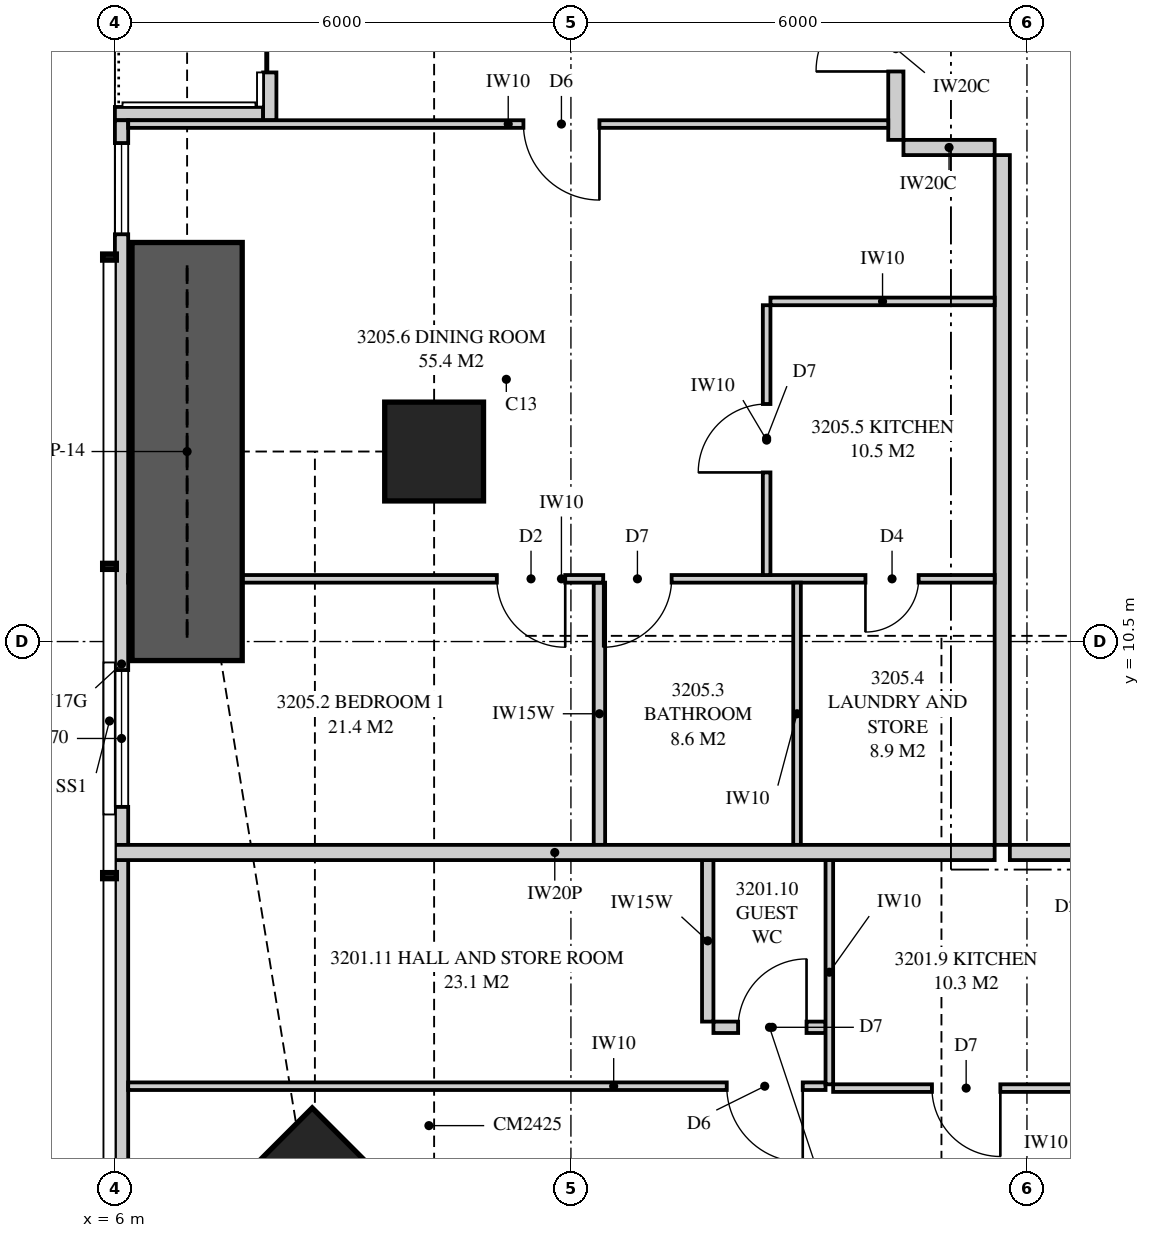
"""IFC4 building model, lengths in metres.
Left out: names, types, materials, properties, quantities, classifications, styles, units other than length and angle.
Written with IfcOpenShell. Run it as: python <this file> out.ifc"""

import sys

from ifc_helpers import new_model, si_unit, direction, frame, frame_2d, origin, origin_2d, place, context, subcontext, project, spatial, polyline, rectangle, outline, extrude, element, fill, save


model = new_model("IFC4")
c1 = context("Model", 3, precision=1e-05, world=origin(), true_north=direction((0.0, 1.0)))
c2 = subcontext(c1, "Body", "Model", "MODEL_VIEW")
j1 = project(units=[si_unit("LENGTHUNIT", "METRE"), si_unit("PLANEANGLEUNIT", "RADIAN")], contexts=[c1])
p1 = place(None, origin())
s1 = spatial("IfcSite", under=j1, at=p1, CompositionType="ELEMENT")
p2 = place(p1, origin())
s2 = spatial("IfcBuilding", under=s1, at=p2, CompositionType="ELEMENT")
p3 = place(p2, frame((0.0, 0.0, 118.25)))
s3 = spatial("IfcBuildingStorey", under=s2, at=p3, CompositionType="ELEMENT", Elevation=118.25)
p4 = place(p3, frame((8.631, 2.631, 0.0), z_axis=(0.0, 0.0, 1.0), x_axis=(0.707106781187, 0.707106781187, 0.0)))
e1 = element("IfcColumn", 1, at=p4, inside=s3, PredefinedType="COLUMN", context=c2, shape_type="SweptSolid", body=[
    extrude(rectangle(XDim=2.4, YDim=2.5, at=origin_2d()), origin(), (0.0, 0.0, 1.0), 3.35),
])
p5 = place(p3, frame((10.2, 13.0, 0.0), z_axis=(0.0, 0.0, 1.0), x_axis=(1.0, 0.0, 0.0)))
e2 = element("IfcColumn", 2, at=p5, inside=s3, PredefinedType="COLUMN", context=c2, shape_type="SweptSolid", body=[
    extrude(rectangle(XDim=1.3, YDim=1.3, at=origin_2d()), origin(), (0.0, 0.0, 1.0), 3.35),
])
p6 = place(p3, frame((6.087, 17.358, 0.0), z_axis=(0.0, 0.0, 1.0), x_axis=(0.0, -1.0, 0.0)))
e3 = element("IfcWall", 3, at=p6, inside=s3, PredefinedType="SOLIDWALL", context=c2, shape_type="SweptSolid", body=[
    extrude(outline(polyline([(0.0, 0.0), (14.307, 0.0), (14.307, 3.11), (4.577, 3.11), (4.577, 2.15), (4.484, 2.15), (4.484, 3.11), (4.358, 3.11), (4.358, 2.15), (0.0, 2.15), (0.0, 0.0)])), frame((0.0, 0.087, 0.0), z_axis=(0.0, -1.0, 0.0), x_axis=(1.0, 0.0, 0.0)), (0.0, 0.0, 1.0), 0.175),
])
p7 = place(p6, frame((0.3, 0.0, 0.4)))
e4 = element("IfcOpeningElement", 4, at=p7, cuts=e3, PredefinedType="OPENING", context=c2, shape_type="SweptSolid", body=[
    extrude(rectangle(XDim=1.2, YDim=1.7, at=frame_2d((0.6, 0.85))), frame((0.0, 0.097, 0.0), z_axis=(0.0, -1.0, 0.0), x_axis=(1.0, 0.0, 0.0)), (0.0, 0.0, 1.0), 0.195),
])
p8 = place(p6, frame((7.233, 0.0, 0.4)))
e5 = element("IfcOpeningElement", 5, at=p8, cuts=e3, PredefinedType="OPENING", context=c2, shape_type="SweptSolid", body=[
    extrude(rectangle(XDim=1.8, YDim=1.7, at=frame_2d((0.9, 0.85))), frame((0.0, 0.097, 0.0), z_axis=(0.0, -1.0, 0.0), x_axis=(1.0, 0.0, 0.0)), (0.0, 0.0, 1.0), 0.195),
])
p9 = place(p3, frame((8.038, 20.417, 0.0), z_axis=(0.0, 0.0, 1.0), x_axis=(0.0, -1.0, 0.0)))
e6 = element("IfcWall", 6, at=p9, inside=s3, PredefinedType="SOLIDWALL", context=c2, shape_type="SweptSolid", body=[
    extrude(rectangle(XDim=3.058, YDim=0.175, at=frame_2d((1.529, 0.0))), origin(), (0.0, 0.0, 1.0), 3.11),
])
p10 = place(p9, frame((0.629, 0.0, 0.0)))
e7 = element("IfcOpeningElement", 7, at=p10, cuts=e6, PredefinedType="OPENING", context=c2, shape_type="SweptSolid", body=[
    extrude(rectangle(XDim=1.8, YDim=2.1, at=frame_2d((0.9, 1.05))), frame((0.0, 0.097, 0.0), z_axis=(0.0, -1.0, 0.0), x_axis=(1.0, 0.0, 0.0)), (0.0, 0.0, 1.0), 0.195),
])
p11 = place(p3, frame((6.0, 17.446, 0.0), z_axis=(0.0, 0.0, 1.0), x_axis=(1.0, 0.0, 0.0)))
e8 = element("IfcWall", 8, at=p11, inside=s3, PredefinedType="SOLIDWALL", context=c2, shape_type="SweptSolid", body=[
    extrude(outline(polyline([(0.0, 0.0), (1.95, 0.0), (1.95, 3.11), (1.75, 3.11), (1.75, 2.15), (0.15, 2.15), (0.15, 3.11), (0.0, 3.11), (0.0, 0.0)])), frame((0.0, 0.087, 0.0), z_axis=(0.0, -1.0, 0.0), x_axis=(1.0, 0.0, 0.0)), (0.0, 0.0, 1.0), 0.175),
])
p12 = place(p3, frame((17.775, 7.725, 0.0), z_axis=(0.0, 0.0, 1.0), x_axis=(1.0, 0.0, 0.0)))
e9 = element("IfcWall", 9, at=p12, inside=s3, PredefinedType="PARTITIONING", context=c2, shape_type="SweptSolid", body=[
    extrude(outline(polyline([(0.0, 0.0), (19.225, 0.0), (19.225, 3.11), (10.312, 3.11), (10.312, 2.541), (9.638, 2.541), (9.638, 3.11), (0.0, 3.11), (0.0, 0.0)])), frame((0.0, 0.1, 0.0), z_axis=(0.0, -1.0, 0.0), x_axis=(1.0, 0.0, 0.0)), (0.0, 0.0, 1.0), 0.2),
])
p13 = place(p12, frame((3.275, 0.0, 0.0)))
e10 = element("IfcOpeningElement", 10, at=p13, cuts=e9, PredefinedType="OPENING", context=c2, shape_type="SweptSolid", body=[
    extrude(rectangle(XDim=1.05, YDim=2.2, at=frame_2d((0.525, 1.1))), frame((0.0, 0.11, 0.0), z_axis=(0.0, -1.0, 0.0), x_axis=(1.0, 0.0, 0.0)), (0.0, 0.0, 1.0), 0.22),
])
p14 = place(p3, frame((15.45, 4.625, 0.0), z_axis=(0.0, 0.0, 1.0), x_axis=(1.0, 0.0, 0.0)))
e11 = element("IfcWall", 11, at=p14, inside=s3, PredefinedType="PARTITIONING", context=c2, shape_type="SweptSolid", body=[
    extrude(outline(polyline([(0.0, 0.0), (3.5, 0.0), (3.5, 3.11), (1.712, 3.11), (1.712, 2.541), (1.138, 2.541), (1.138, 3.11), (0.0, 3.11), (0.0, 0.0)])), frame((0.0, 0.05, 0.0), z_axis=(0.0, -1.0, 0.0), x_axis=(1.0, 0.0, 0.0)), (0.0, 0.0, 1.0), 0.1),
])
p15 = place(p14, frame((1.3, 0.0, 0.0)))
e12 = element("IfcOpeningElement", 12, at=p15, cuts=e11, PredefinedType="OPENING", context=c2, shape_type="SweptSolid", body=[
    extrude(rectangle(XDim=0.9, YDim=2.1, at=frame_2d((0.45, 1.05))), frame((0.0, 0.06, 0.0), z_axis=(0.0, -1.0, 0.0), x_axis=(1.0, 0.0, 0.0)), (0.0, 0.0, 1.0), 0.12),
])
p16 = place(p3, frame((15.4, 4.675, 0.0), z_axis=(0.0, 0.0, 1.0), x_axis=(0.0, 1.0, 0.0)))
e13 = element("IfcWall", 13, at=p16, inside=s3, PredefinedType="PARTITIONING", context=c2, shape_type="SweptSolid", body=[
    extrude(rectangle(XDim=2.95, YDim=0.1, at=frame_2d((1.475, 0.0))), origin(), (0.0, 0.0, 1.0), 3.11),
])
p17 = place(p3, frame((13.875, 5.425, 0.0), z_axis=(0.0, 0.0, 1.0), x_axis=(1.0, 0.0, 0.0)))
e14 = element("IfcWall", 14, at=p17, inside=s3, PredefinedType="PLUMBINGWALL", context=c2, shape_type="SweptSolid", body=[
    extrude(rectangle(XDim=1.475, YDim=0.15, at=frame_2d((0.738, 0.0))), origin(), (0.0, 0.0, 1.0), 3.11),
])
p18 = place(p17, frame((0.325, 0.0, 0.0)))
e15 = element("IfcOpeningElement", 15, at=p18, cuts=e14, PredefinedType="OPENING", context=c2, shape_type="SweptSolid", body=[
    extrude(rectangle(XDim=0.9, YDim=2.1, at=frame_2d((0.45, 1.05))), frame((0.0, 0.085, 0.0), z_axis=(0.0, -1.0, 0.0), x_axis=(1.0, 0.0, 0.0)), (0.0, 0.0, 1.0), 0.17),
])
p19 = place(p3, frame((13.8, 5.5, 0.0), z_axis=(0.0, 0.0, 1.0), x_axis=(0.0, 1.0, 0.0)))
e16 = element("IfcWall", 16, at=p19, inside=s3, PredefinedType="PLUMBINGWALL", context=c2, shape_type="SweptSolid", body=[
    extrude(rectangle(XDim=2.125, YDim=0.15, at=frame_2d((1.062, 0.0))), origin(), (0.0, 0.0, 1.0), 3.11),
])
p20 = place(p3, frame((6.175, 4.65, 0.0), z_axis=(0.0, 0.0, 1.0), x_axis=(1.0, 0.0, 0.0)))
e17 = element("IfcWall", 17, at=p20, inside=s3, PredefinedType="PARTITIONING", context=c2, shape_type="SweptSolid", body=[
    extrude(outline(polyline([(0.0, 0.0), (9.175, 0.0), (9.175, 3.11), (5.285, 3.11), (5.285, 2.51), (3.0, 2.51), (3.0, 2.15), (1.258, 2.15), (1.258, 3.11), (0.0, 3.11), (0.0, 0.0)])), frame((0.0, 0.05, 0.0), z_axis=(0.0, -1.0, 0.0), x_axis=(1.0, 0.0, 0.0)), (0.0, 0.0, 1.0), 0.1),
])
p21 = place(p20, frame((7.875, 0.0, 0.0)))
e18 = element("IfcOpeningElement", 18, at=p21, cuts=e17, PredefinedType="OPENING", context=c2, shape_type="SweptSolid", body=[
    extrude(rectangle(XDim=1.0, YDim=2.1, at=frame_2d((0.5, 1.05))), frame((0.0, 0.06, 0.0), z_axis=(0.0, -1.0, 0.0), x_axis=(1.0, 0.0, 0.0)), (0.0, 0.0, 1.0), 0.12),
])
p22 = place(p3, frame((6.0, 7.725, 0.0), z_axis=(0.0, 0.0, 1.0), x_axis=(1.0, 0.0, 0.0)))
e19 = element("IfcWall", 19, at=p22, inside=s3, PredefinedType="PARTITIONING", context=c2, shape_type="SweptSolid", body=[
    extrude(outline(polyline([(0.0, 0.0), (11.575, 0.0), (11.575, 3.11), (11.212, 3.11), (11.212, 2.541), (10.538, 2.541), (10.538, 3.11), (5.51, 3.11), (5.51, 2.51), (2.969, 2.51), (2.969, 2.541), (2.727, 2.541), (2.727, 2.15), (0.884, 2.15), (0.884, 3.11), (0.0, 3.11), (0.0, 0.0)])), frame((0.0, 0.1, 0.0), z_axis=(0.0, -1.0, 0.0), x_axis=(1.0, 0.0, 0.0)), (0.0, 0.0, 1.0), 0.2),
])
p23 = place(p3, frame((17.675, 7.825, 0.0), z_axis=(0.0, 0.0, 1.0), x_axis=(0.0, 1.0, 0.0)))
e20 = element("IfcWall", 20, at=p23, inside=s3, PredefinedType="PARTITIONING", context=c2, shape_type="SweptSolid", body=[
    extrude(outline(polyline([(0.0, 0.0), (9.075, 0.0), (9.075, 3.11), (3.087, 3.11), (3.087, 2.541), (2.413, 2.541), (2.413, 3.11), (0.0, 3.11), (0.0, 0.0)])), frame((0.0, 0.1, 0.0), z_axis=(0.0, -1.0, 0.0), x_axis=(1.0, 0.0, 0.0)), (0.0, 0.0, 1.0), 0.2),
])
p24 = place(p3, frame((6.175, 11.325, 0.0), z_axis=(0.0, 0.0, 1.0), x_axis=(1.0, 0.0, 0.0)))
e21 = element("IfcWall", 21, at=p24, inside=s3, PredefinedType="PARTITIONING", context=c2, shape_type="SweptSolid", body=[
    extrude(outline(polyline([(0.175, 3.11), (0.0, 3.11), (0.0, 0.0), (0.529, 0.0), (0.529, 0.325), (1.021, 0.325), (1.021, 0.0), (11.4, 0.0), (11.4, 3.11), (5.285, 3.11), (5.285, 2.51), (2.765, 2.51), (2.765, 3.11), (2.744, 3.11), (2.744, 2.541), (2.169, 2.541), (2.169, 3.11), (1.918, 3.11), (1.918, 2.15), (1.021, 2.15), (1.021, 1.825), (0.529, 1.825), (0.529, 2.15), (0.175, 2.15), (0.175, 3.11)])), frame((0.0, 0.05, 0.0), z_axis=(0.0, -1.0, 0.0), x_axis=(1.0, 0.0, 0.0)), (0.0, 0.0, 1.0), 0.1),
])
p25 = place(p24, frame((4.85, 0.0, 0.0)))
e22 = element("IfcOpeningElement", 22, at=p25, cuts=e21, PredefinedType="OPENING", context=c2, shape_type="SweptSolid", body=[
    extrude(rectangle(XDim=0.9, YDim=2.1, at=frame_2d((0.45, 1.05))), frame((0.0, 0.06, 0.0), z_axis=(0.0, -1.0, 0.0), x_axis=(1.0, 0.0, 0.0)), (0.0, 0.0, 1.0), 0.12),
])
p26 = place(p24, frame((6.25, 0.0, 0.0)))
e23 = element("IfcOpeningElement", 23, at=p26, cuts=e21, PredefinedType="OPENING", context=c2, shape_type="SweptSolid", body=[
    extrude(rectangle(XDim=0.9, YDim=2.1, at=frame_2d((0.45, 1.05))), frame((0.0, 0.06, 0.0), z_axis=(0.0, -1.0, 0.0), x_axis=(1.0, 0.0, 0.0)), (0.0, 0.0, 1.0), 0.12),
])
p27 = place(p24, frame((9.7, 0.0, 0.0)))
e24 = element("IfcOpeningElement", 24, at=p27, cuts=e21, PredefinedType="OPENING", context=c2, shape_type="SweptSolid", body=[
    extrude(rectangle(XDim=0.7, YDim=2.1, at=frame_2d((0.35, 1.05))), frame((0.0, 0.06, 0.0), z_axis=(0.0, -1.0, 0.0), x_axis=(1.0, 0.0, 0.0)), (0.0, 0.0, 1.0), 0.12),
])
p28 = place(p3, frame((12.375, 7.825, 0.0), z_axis=(0.0, 0.0, 1.0), x_axis=(0.0, 1.0, 0.0)))
e25 = element("IfcWall", 25, at=p28, inside=s3, PredefinedType="PLUMBINGWALL", context=c2, shape_type="SweptSolid", body=[
    extrude(outline(polyline([(0.0, 0.0), (3.45, 0.0), (3.45, 3.11), (3.062, 3.11), (3.062, 2.541), (2.438, 2.541), (2.438, 3.11), (0.0, 3.11), (0.0, 0.0)])), frame((0.0, 0.075, 0.0), z_axis=(0.0, -1.0, 0.0), x_axis=(1.0, 0.0, 0.0)), (0.0, 0.0, 1.0), 0.15),
])
p29 = place(p3, frame((14.975, 7.825, 0.0), z_axis=(0.0, 0.0, 1.0), x_axis=(0.0, 1.0, 0.0)))
e26 = element("IfcWall", 26, at=p29, inside=s3, PredefinedType="PARTITIONING", context=c2, shape_type="SweptSolid", body=[
    extrude(outline(polyline([(0.0, 0.0), (3.45, 0.0), (3.45, 3.11), (3.037, 3.11), (3.037, 2.541), (2.463, 2.541), (2.463, 3.11), (0.0, 3.11), (0.0, 0.0)])), frame((0.0, 0.05, 0.0), z_axis=(0.0, -1.0, 0.0), x_axis=(1.0, 0.0, 0.0)), (0.0, 0.0, 1.0), 0.1),
])
p30 = place(p3, frame((14.575, 11.375, 0.0), z_axis=(0.0, 0.0, 1.0), x_axis=(0.0, 1.0, 0.0)))
e27 = element("IfcWall", 27, at=p30, inside=s3, PredefinedType="PARTITIONING", context=c2, shape_type="SweptSolid", body=[
    extrude(rectangle(XDim=3.55, YDim=0.1, at=frame_2d((1.775, 0.0))), origin(), (0.0, 0.0, 1.0), 3.11),
])
p31 = place(p30, frame((1.35, 0.0, 0.0)))
e28 = element("IfcOpeningElement", 28, at=p31, cuts=e27, PredefinedType="OPENING", context=c2, shape_type="SweptSolid", body=[
    extrude(rectangle(XDim=0.9, YDim=2.1, at=frame_2d((0.45, 1.05))), frame((0.0, 0.06, 0.0), z_axis=(0.0, -1.0, 0.0), x_axis=(1.0, 0.0, 0.0)), (0.0, 0.0, 1.0), 0.12),
])
p32 = place(p3, frame((14.625, 14.975, 0.0), z_axis=(0.0, 0.0, 1.0), x_axis=(1.0, 0.0, 0.0)))
e29 = element("IfcWall", 29, at=p32, inside=s3, PredefinedType="PARTITIONING", context=c2, shape_type="SweptSolid", body=[
    extrude(rectangle(XDim=2.95, YDim=0.1, at=frame_2d((1.475, 0.0))), origin(), (0.0, 0.0, 1.0), 3.11),
])
p33 = place(p3, frame((6.175, 17.308, 0.0), z_axis=(0.0, 0.0, 1.0), x_axis=(1.0, 0.0, 0.0)))
e30 = element("IfcWall", 30, at=p33, inside=s3, PredefinedType="PARTITIONING", context=c2, shape_type="SweptSolid", body=[
    extrude(outline(polyline([(0.0, 0.0), (10.0, 0.0), (10.0, 3.11), (5.285, 3.11), (5.285, 2.51), (2.765, 2.51), (2.765, 3.11), (1.635, 3.11), (1.635, 2.15), (0.0, 2.15), (0.0, 3.11), (0.0, 0.0)])), frame((0.0, 0.05, 0.0), z_axis=(0.0, -1.0, 0.0), x_axis=(1.0, 0.0, 0.0)), (0.0, 0.0, 1.0), 0.1),
])
p34 = place(p33, frame((5.2, 0.0, 0.0)))
e31 = element("IfcOpeningElement", 31, at=p34, cuts=e30, PredefinedType="OPENING", context=c2, shape_type="SweptSolid", body=[
    extrude(rectangle(XDim=1.0, YDim=2.1, at=frame_2d((0.5, 1.05))), frame((0.0, 0.06, 0.0), z_axis=(0.0, -1.0, 0.0), x_axis=(1.0, 0.0, 0.0)), (0.0, 0.0, 1.0), 0.12),
])
p35 = place(p3, frame((16.275, 17.1, 0.0), z_axis=(0.0, 0.0, 1.0), x_axis=(0.0, 1.0, 0.0)))
e32 = element("IfcWall", 32, at=p35, inside=s3, PredefinedType="PARTITIONING", context=c2, shape_type="SweptSolid", body=[
    extrude(rectangle(XDim=2.4, YDim=0.2, at=frame_2d((1.2, 0.0))), origin(), (0.0, 0.0, 1.0), 3.11),
])
p36 = place(p35, frame((0.9, 0.0, 0.0)))
e33 = element("IfcOpeningElement", 33, at=p36, cuts=e32, PredefinedType="OPENING", context=c2, shape_type="SweptSolid", body=[
    extrude(rectangle(XDim=1.05, YDim=2.2, at=frame_2d((0.525, 1.1))), frame((0.0, 0.11, 0.0), z_axis=(0.0, -1.0, 0.0), x_axis=(1.0, 0.0, 0.0)), (0.0, 0.0, 1.0), 0.22),
])
p37 = place(p3, frame((17.575, 17.0, 0.0), z_axis=(0.0, 0.0, 1.0), x_axis=(-1.0, 0.0, 0.0)))
e34 = element("IfcWall", 34, at=p37, inside=s3, PredefinedType="PARTITIONING", context=c2, shape_type="SweptSolid", body=[
    extrude(rectangle(XDim=1.2, YDim=0.2, at=frame_2d((0.6, 0.0))), origin(), (0.0, 0.0, 1.0), 3.11),
])
p38 = place(p3, frame((6.95, 10.25, 0.0), z_axis=(0.0, 0.0, 1.0), x_axis=(0.0, 1.0, 0.0)))
e35 = element("IfcWall", 35, at=p38, inside=s3, PredefinedType="SHEAR", context=c2, shape_type="SweptSolid", body=[
    extrude(rectangle(XDim=5.5, YDim=1.45, at=frame_2d((2.75, 0.0))), origin(), (0.0, 0.0, 1.0), 3.35),
])
p39 = place(p10, origin())
e36 = element("IfcDoor", 36, at=p39, inside=s3, OperationType="SLIDING_TO_LEFT", PredefinedType="DOOR", context=c2, shape_type="SweptSolid", body=[
    extrude(rectangle(XDim=1.8, YDim=2.1, at=frame_2d((0.9, 1.05))), frame((0.0, 0.025, 0.0), z_axis=(0.0, -1.0, 0.0), x_axis=(1.0, 0.0, 0.0)), (0.0, 0.0, 1.0), 0.05),
])
fill(e7, e36)
p40 = place(p7, origin())
e37 = element("IfcWindow", 37, at=p40, inside=s3, PartitioningType="SINGLE_PANEL", PredefinedType="WINDOW", context=c2, shape_type="SweptSolid", body=[
    extrude(rectangle(XDim=1.2, YDim=1.7, at=frame_2d((0.6, 0.85))), frame((0.0, 0.03, 0.0), z_axis=(0.0, -1.0, 0.0), x_axis=(1.0, 0.0, 0.0)), (0.0, 0.0, 1.0), 0.06),
])
fill(e4, e37)
p41 = place(p8, origin())
e38 = element("IfcWindow", 38, at=p41, inside=s3, PartitioningType="SINGLE_PANEL", PredefinedType="WINDOW", context=c2, shape_type="SweptSolid", body=[
    extrude(rectangle(XDim=1.8, YDim=1.7, at=frame_2d((0.9, 0.85))), frame((0.0, 0.03, 0.0), z_axis=(0.0, -1.0, 0.0), x_axis=(1.0, 0.0, 0.0)), (0.0, 0.0, 1.0), 0.06),
])
fill(e5, e38)
p42 = place(p15, frame((0.9, 0.0, 0.0), z_axis=(0.0, 0.0, 1.0), x_axis=(-1.0, 0.0, 0.0)))
e39 = element("IfcDoor", 39, at=p42, inside=s3, OperationType="SINGLE_SWING_LEFT", PredefinedType="DOOR", context=c2, shape_type="SweptSolid", body=[
    extrude(rectangle(XDim=0.9, YDim=2.1, at=frame_2d((0.45, 1.05))), frame((0.0, 0.025, 0.0), z_axis=(0.0, -1.0, 0.0), x_axis=(1.0, 0.0, 0.0)), (0.0, 0.0, 1.0), 0.05),
])
fill(e12, e39)
p43 = place(p18, origin())
e40 = element("IfcDoor", 40, at=p43, inside=s3, OperationType="SINGLE_SWING_RIGHT", PredefinedType="DOOR", context=c2, shape_type="SweptSolid", body=[
    extrude(rectangle(XDim=0.9, YDim=2.1, at=frame_2d((0.45, 1.05))), frame((0.0, 0.025, 0.0), z_axis=(0.0, -1.0, 0.0), x_axis=(1.0, 0.0, 0.0)), (0.0, 0.0, 1.0), 0.05),
])
fill(e15, e40)
p44 = place(p21, frame((1.0, 0.0, 0.0), z_axis=(0.0, 0.0, 1.0), x_axis=(-1.0, 0.0, 0.0)))
e41 = element("IfcDoor", 41, at=p44, inside=s3, OperationType="SINGLE_SWING_LEFT", PredefinedType="DOOR", context=c2, shape_type="SweptSolid", body=[
    extrude(rectangle(XDim=1.0, YDim=2.1, at=frame_2d((0.5, 1.05))), frame((0.0, 0.025, 0.0), z_axis=(0.0, -1.0, 0.0), x_axis=(1.0, 0.0, 0.0)), (0.0, 0.0, 1.0), 0.05),
])
fill(e18, e41)
p45 = place(p36, origin())
e42 = element("IfcDoor", 42, at=p45, inside=s3, OperationType="SINGLE_SWING_LEFT", PredefinedType="DOOR", context=c2, shape_type="SweptSolid", body=[
    extrude(rectangle(XDim=1.05, YDim=2.2, at=frame_2d((0.525, 1.1))), frame((0.0, 0.025, 0.0), z_axis=(0.0, -1.0, 0.0), x_axis=(1.0, 0.0, 0.0)), (0.0, 0.0, 1.0), 0.05),
])
fill(e33, e42)
p46 = place(p25, frame((0.9, 0.0, 0.0), z_axis=(0.0, 0.0, 1.0), x_axis=(-1.0, 0.0, 0.0)))
e43 = element("IfcDoor", 43, at=p46, inside=s3, OperationType="SINGLE_SWING_LEFT", PredefinedType="DOOR", context=c2, shape_type="SweptSolid", body=[
    extrude(rectangle(XDim=0.9, YDim=2.1, at=frame_2d((0.45, 1.05))), frame((0.0, 0.025, 0.0), z_axis=(0.0, -1.0, 0.0), x_axis=(1.0, 0.0, 0.0)), (0.0, 0.0, 1.0), 0.05),
])
fill(e22, e43)
p47 = place(p26, frame((0.9, 0.0, 0.0), z_axis=(0.0, 0.0, 1.0), x_axis=(-1.0, 0.0, 0.0)))
e44 = element("IfcDoor", 44, at=p47, inside=s3, OperationType="SINGLE_SWING_RIGHT", PredefinedType="DOOR", context=c2, shape_type="SweptSolid", body=[
    extrude(rectangle(XDim=0.9, YDim=2.1, at=frame_2d((0.45, 1.05))), frame((0.0, 0.025, 0.0), z_axis=(0.0, -1.0, 0.0), x_axis=(1.0, 0.0, 0.0)), (0.0, 0.0, 1.0), 0.05),
])
fill(e23, e44)
p48 = place(p27, frame((0.7, 0.0, 0.0), z_axis=(0.0, 0.0, 1.0), x_axis=(-1.0, 0.0, 0.0)))
e45 = element("IfcDoor", 45, at=p48, inside=s3, OperationType="SINGLE_SWING_RIGHT", PredefinedType="DOOR", context=c2, shape_type="SweptSolid", body=[
    extrude(rectangle(XDim=0.7, YDim=2.1, at=frame_2d((0.35, 1.05))), frame((0.0, 0.025, 0.0), z_axis=(0.0, -1.0, 0.0), x_axis=(1.0, 0.0, 0.0)), (0.0, 0.0, 1.0), 0.05),
])
fill(e24, e45)
p49 = place(p31, origin())
e46 = element("IfcDoor", 46, at=p49, inside=s3, OperationType="SINGLE_SWING_LEFT", PredefinedType="DOOR", context=c2, shape_type="SweptSolid", body=[
    extrude(rectangle(XDim=0.9, YDim=2.1, at=frame_2d((0.45, 1.05))), frame((0.0, 0.025, 0.0), z_axis=(0.0, -1.0, 0.0), x_axis=(1.0, 0.0, 0.0)), (0.0, 0.0, 1.0), 0.05),
])
fill(e28, e46)
p50 = place(p34, frame((1.0, 0.0, 0.0), z_axis=(0.0, 0.0, 1.0), x_axis=(-1.0, 0.0, 0.0)))
e47 = element("IfcDoor", 47, at=p50, inside=s3, OperationType="SINGLE_SWING_LEFT", PredefinedType="DOOR", context=c2, shape_type="SweptSolid", body=[
    extrude(rectangle(XDim=1.0, YDim=2.1, at=frame_2d((0.5, 1.05))), frame((0.0, 0.025, 0.0), z_axis=(0.0, -1.0, 0.0), x_axis=(1.0, 0.0, 0.0)), (0.0, 0.0, 1.0), 0.05),
])
fill(e31, e47)
save(model, sys.argv[1])
